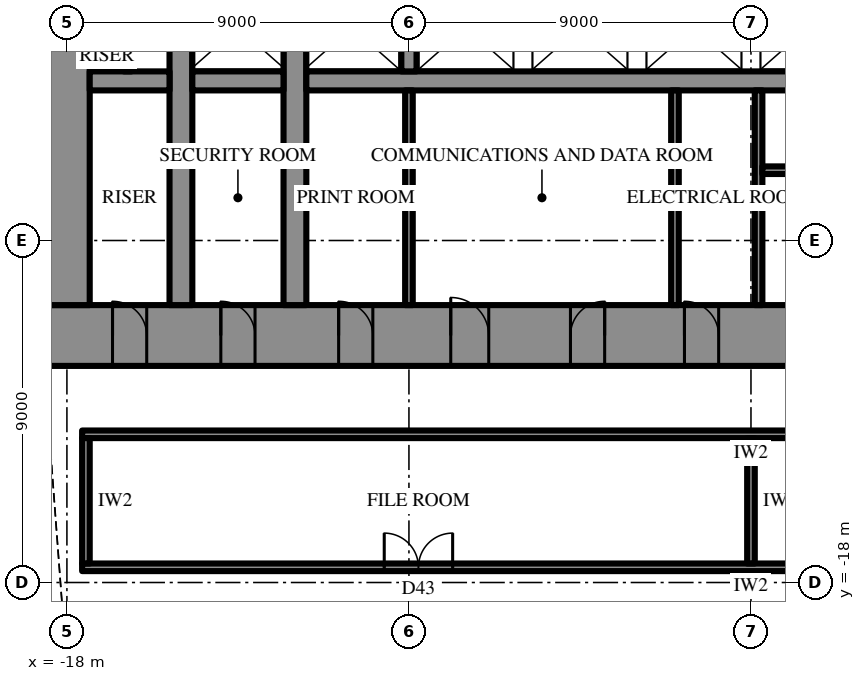
"""IFC4 building model, lengths in metres.
Left out: names, types, materials, properties, quantities, classifications, styles, units other than length and angle.
Written with IfcOpenShell. Run it as: python <this file> out.ifc"""

import sys

from ifc_helpers import new_model, si_unit, direction, frame, frame_2d, origin, place, context, subcontext, project, spatial, rectangle, extrude, element, fill, save


model = new_model("IFC4")
c1 = context("Model", 3, precision=1e-05, world=origin(), true_north=direction((0.0, 1.0)))
c2 = subcontext(c1, "Body", "Model", "MODEL_VIEW")
j1 = project(units=[si_unit("LENGTHUNIT", "METRE"), si_unit("PLANEANGLEUNIT", "RADIAN")], contexts=[c1])
p1 = place(None, origin())
s1 = spatial("IfcSite", under=j1, at=p1, CompositionType="ELEMENT")
p2 = place(p1, origin())
s2 = spatial("IfcBuilding", under=s1, at=p2, CompositionType="ELEMENT")
p3 = place(p2, frame((0.0, 0.0, 127.9)))
s3 = spatial("IfcBuildingStorey", under=s2, at=p3, CompositionType="ELEMENT", Elevation=127.9)
p4 = place(p3, frame((18.6, -11.5, 0.0), z_axis=(0.0, 0.0, 1.0), x_axis=(-1.0, 0.0, 0.0)))
e1 = element("IfcWall", 1, at=p4, inside=s3, PredefinedType="SHEAR", context=c2, shape_type="SweptSolid", body=[
    extrude(rectangle(XDim=37.2, YDim=1.6, at=frame_2d((18.6, 0.0))), origin(), (0.0, 0.0, 1.0), 4.2),
])
p5 = place(p4, frame((19.45, 0.0, 0.0)))
e2 = element("IfcOpeningElement", 2, at=p5, cuts=e1, PredefinedType="OPENING", context=c2, shape_type="SweptSolid", body=[
    extrude(rectangle(XDim=0.9, YDim=2.2, at=frame_2d((0.45, 1.1))), frame((0.0, 0.81, 0.0), z_axis=(0.0, -1.0, 0.0), x_axis=(1.0, 0.0, 0.0)), (0.0, 0.0, 1.0), 1.62),
])
p6 = place(p4, frame((22.45, 0.0, 0.0)))
e3 = element("IfcOpeningElement", 3, at=p6, cuts=e1, PredefinedType="OPENING", context=c2, shape_type="SweptSolid", body=[
    extrude(rectangle(XDim=0.9, YDim=2.2, at=frame_2d((0.45, 1.1))), frame((0.0, 0.81, 0.0), z_axis=(0.0, -1.0, 0.0), x_axis=(1.0, 0.0, 0.0)), (0.0, 0.0, 1.0), 1.62),
])
p7 = place(p4, frame((25.5, 0.0, 0.0)))
e4 = element("IfcOpeningElement", 4, at=p7, cuts=e1, PredefinedType="OPENING", context=c2, shape_type="SweptSolid", body=[
    extrude(rectangle(XDim=1.0, YDim=2.2, at=frame_2d((0.5, 1.1))), frame((0.0, 0.81, 0.0), z_axis=(0.0, -1.0, 0.0), x_axis=(1.0, 0.0, 0.0)), (0.0, 0.0, 1.0), 1.62),
])
p8 = place(p4, frame((1.8, 0.0, 0.0)))
e5 = element("IfcOpeningElement", 5, at=p8, cuts=e1, PredefinedType="OPENING", context=c2, shape_type="SweptSolid", body=[
    extrude(rectangle(XDim=0.9, YDim=2.2, at=frame_2d((0.45, 1.1))), frame((0.0, 0.81, 0.0), z_axis=(0.0, -1.0, 0.0), x_axis=(1.0, 0.0, 0.0)), (0.0, 0.0, 1.0), 1.62),
])
p9 = place(p4, frame((4.65, 0.0, 0.0)))
e6 = element("IfcOpeningElement", 6, at=p9, cuts=e1, PredefinedType="OPENING", context=c2, shape_type="SweptSolid", body=[
    extrude(rectangle(XDim=0.9, YDim=2.2, at=frame_2d((0.45, 1.1))), frame((0.0, 0.81, 0.0), z_axis=(0.0, -1.0, 0.0), x_axis=(1.0, 0.0, 0.0)), (0.0, 0.0, 1.0), 1.62),
])
p10 = place(p4, frame((7.75, 0.0, 0.0)))
e7 = element("IfcOpeningElement", 7, at=p10, cuts=e1, PredefinedType="OPENING", context=c2, shape_type="SweptSolid", body=[
    extrude(rectangle(XDim=0.9, YDim=2.2, at=frame_2d((0.45, 1.1))), frame((0.0, 0.81, 0.0), z_axis=(0.0, -1.0, 0.0), x_axis=(1.0, 0.0, 0.0)), (0.0, 0.0, 1.0), 1.62),
])
p11 = place(p4, frame((28.55, 0.0, 0.0)))
e8 = element("IfcOpeningElement", 8, at=p11, cuts=e1, PredefinedType="OPENING", context=c2, shape_type="SweptSolid", body=[
    extrude(rectangle(XDim=0.9, YDim=2.2, at=frame_2d((0.45, 1.1))), frame((0.0, 0.81, 0.0), z_axis=(0.0, -1.0, 0.0), x_axis=(1.0, 0.0, 0.0)), (0.0, 0.0, 1.0), 1.62),
])
p12 = place(p4, frame((31.65, 0.0, 0.0)))
e9 = element("IfcOpeningElement", 9, at=p12, cuts=e1, PredefinedType="OPENING", context=c2, shape_type="SweptSolid", body=[
    extrude(rectangle(XDim=0.9, YDim=2.2, at=frame_2d((0.45, 1.1))), frame((0.0, 0.81, 0.0), z_axis=(0.0, -1.0, 0.0), x_axis=(1.0, 0.0, 0.0)), (0.0, 0.0, 1.0), 1.62),
])
p13 = place(p4, frame((34.5, 0.0, 0.0)))
e10 = element("IfcOpeningElement", 10, at=p13, cuts=e1, PredefinedType="OPENING", context=c2, shape_type="SweptSolid", body=[
    extrude(rectangle(XDim=0.9, YDim=2.2, at=frame_2d((0.45, 1.1))), frame((0.0, 0.81, 0.0), z_axis=(0.0, -1.0, 0.0), x_axis=(1.0, 0.0, 0.0)), (0.0, 0.0, 1.0), 1.62),
])
p14 = place(p3, frame((-18.0, 10.7, 0.0), z_axis=(0.0, 0.0, 1.0), x_axis=(0.0, -1.0, 0.0)))
e11 = element("IfcWall", 11, at=p14, inside=s3, PredefinedType="SHEAR", context=c2, shape_type="SweptSolid", body=[
    extrude(rectangle(XDim=21.4, YDim=1.2, at=frame_2d((10.7, 0.0))), origin(), (0.0, 0.0, 1.0), 4.2),
])
p15 = place(p14, frame((9.8, 0.0, 0.0)))
e12 = element("IfcOpeningElement", 12, at=p15, cuts=e11, PredefinedType="OPENING", context=c2, shape_type="SweptSolid", body=[
    extrude(rectangle(XDim=1.8, YDim=2.4, at=frame_2d((0.9, 1.2))), frame((0.0, 0.61, 0.0), z_axis=(0.0, -1.0, 0.0), x_axis=(1.0, 0.0, 0.0)), (0.0, 0.0, 1.0), 1.22),
])
p16 = place(p3, frame((-12.0, -10.7, 0.0), z_axis=(0.0, 0.0, 1.0), x_axis=(0.0, 1.0, 0.0)))
e13 = element("IfcWall", 13, at=p16, inside=s3, PredefinedType="SHEAR", context=c2, shape_type="SweptSolid", body=[
    extrude(rectangle(XDim=21.4, YDim=0.6, at=frame_2d((10.7, 0.0))), origin(), (0.0, 0.0, 1.0), 4.2),
])
p17 = place(p16, frame((9.8, 0.0, 0.0)))
e14 = element("IfcOpeningElement", 14, at=p17, cuts=e13, PredefinedType="OPENING", context=c2, shape_type="SweptSolid", body=[
    extrude(rectangle(XDim=1.8, YDim=2.4, at=frame_2d((0.9, 1.2))), frame((0.0, 0.31, 0.0), z_axis=(0.0, -1.0, 0.0), x_axis=(1.0, 0.0, 0.0)), (0.0, 0.0, 1.0), 0.62),
])
p18 = place(p3, frame((-15.0, -10.7, 0.0), z_axis=(0.0, 0.0, 1.0), x_axis=(0.0, 1.0, 0.0)))
e15 = element("IfcWall", 15, at=p18, inside=s3, PredefinedType="SHEAR", context=c2, shape_type="SweptSolid", body=[
    extrude(rectangle(XDim=21.4, YDim=0.6, at=frame_2d((10.7, 0.0))), origin(), (0.0, 0.0, 1.0), 4.2),
])
p19 = place(p18, frame((9.8, 0.0, 0.0)))
e16 = element("IfcOpeningElement", 16, at=p19, cuts=e15, PredefinedType="OPENING", context=c2, shape_type="SweptSolid", body=[
    extrude(rectangle(XDim=1.8, YDim=2.4, at=frame_2d((0.9, 1.2))), frame((0.0, 0.31, 0.0), z_axis=(0.0, -1.0, 0.0), x_axis=(1.0, 0.0, 0.0)), (0.0, 0.0, 1.0), 0.62),
])
p20 = place(p3, frame((11.7, -4.8, 0.0), z_axis=(0.0, 0.0, 1.0), x_axis=(-1.0, 0.0, 0.0)))
e17 = element("IfcWall", 17, at=p20, inside=s3, PredefinedType="SHEAR", context=c2, shape_type="SweptSolid", body=[
    extrude(rectangle(XDim=23.4, YDim=0.5, at=frame_2d((11.7, 0.0))), origin(), (0.0, 0.0, 1.0), 4.2),
])
p21 = place(p20, frame((6.6, 0.0, 0.0)))
e18 = element("IfcOpeningElement", 18, at=p21, cuts=e17, PredefinedType="OPENING", context=c2, shape_type="SweptSolid", body=[
    extrude(rectangle(XDim=1.2, YDim=2.2, at=frame_2d((0.6, 1.1))), frame((0.0, 0.26, 0.0), z_axis=(0.0, -1.0, 0.0), x_axis=(1.0, 0.0, 0.0)), (0.0, 0.0, 1.0), 0.52),
])
p22 = place(p20, frame((3.6, 0.0, 0.0)))
e19 = element("IfcOpeningElement", 19, at=p22, cuts=e17, PredefinedType="OPENING", context=c2, shape_type="SweptSolid", body=[
    extrude(rectangle(XDim=1.2, YDim=2.2, at=frame_2d((0.6, 1.1))), frame((0.0, 0.26, 0.0), z_axis=(0.0, -1.0, 0.0), x_axis=(1.0, 0.0, 0.0)), (0.0, 0.0, 1.0), 0.52),
])
p23 = place(p3, frame((-12.3, -4.8, 0.0), z_axis=(0.0, 0.0, 1.0), x_axis=(-1.0, 0.0, 0.0)))
e20 = element("IfcWall", 20, at=p23, inside=s3, PredefinedType="SHEAR", context=c2, shape_type="SweptSolid", body=[
    extrude(rectangle(XDim=2.4, YDim=0.5, at=frame_2d((1.2, 0.0))), origin(), (0.0, 0.0, 1.0), 4.2),
])
p24 = place(p3, frame((-15.3, -4.8, 0.0), z_axis=(0.0, 0.0, 1.0), x_axis=(-1.0, 0.0, 0.0)))
e21 = element("IfcWall", 21, at=p24, inside=s3, PredefinedType="SHEAR", context=c2, shape_type="SweptSolid", body=[
    extrude(rectangle(XDim=2.1, YDim=0.5, at=frame_2d((1.05, 0.0))), origin(), (0.0, 0.0, 1.0), 4.2),
])
p25 = place(p3, frame((-9.0, -2.25, 0.0), z_axis=(0.0, 0.0, 1.0), x_axis=(0.0, -1.0, 0.0)))
e22 = element("IfcWall", 22, at=p25, inside=s3, PredefinedType="SHEAR", context=c2, shape_type="SweptSolid", body=[
    extrude(rectangle(XDim=2.3, YDim=0.4, at=frame_2d((1.15, 0.0))), origin(), (0.0, 0.0, 1.0), 4.2),
])
p26 = place(p3, frame((0.2, -5.05, 0.0), z_axis=(0.0, 0.0, 1.0), x_axis=(0.0, -1.0, 0.0)))
e23 = element("IfcWall", 23, at=p26, inside=s3, PredefinedType="SHEAR", context=c2, shape_type="SweptSolid", body=[
    extrude(rectangle(XDim=5.65, YDim=0.2, at=frame_2d((2.825, 0.0))), origin(), (0.0, 0.0, 1.0), 4.2),
])
p27 = place(p3, frame((8.9, -7.15, 0.0), z_axis=(0.0, 0.0, 1.0), x_axis=(-1.0, 0.0, 0.0)))
e24 = element("IfcWall", 24, at=p27, inside=s3, PredefinedType="SHEAR", context=c2, shape_type="SweptSolid", body=[
    extrude(rectangle(XDim=8.6, YDim=0.2, at=frame_2d((4.3, 0.0))), origin(), (0.0, 0.0, 1.0), 4.2),
])
p28 = place(p27, frame((0.3, 0.0, 0.0)))
e25 = element("IfcOpeningElement", 25, at=p28, cuts=e24, PredefinedType="OPENING", context=c2, shape_type="SweptSolid", body=[
    extrude(rectangle(XDim=1.0, YDim=2.2, at=frame_2d((0.5, 1.1))), frame((0.0, 0.11, 0.0), z_axis=(0.0, -1.0, 0.0), x_axis=(1.0, 0.0, 0.0)), (0.0, 0.0, 1.0), 0.22),
])
for number, where, z_axis, x_axis in (
    (26, (-9.0, -5.05, 0.0), (0.0, 0.0, 1.0), (0.0, -1.0, 0.0)),
    (27, (-2.0, -5.05, 0.0), (0.0, 0.0, 1.0), (0.0, -1.0, 0.0)),
):
    element("IfcWall", number, at=place(p3, frame(where, z_axis=z_axis, x_axis=x_axis)), inside=s3, PredefinedType="PARTITIONING", context=c2, shape_type="SweptSolid", body=[
        extrude(rectangle(XDim=5.65, YDim=0.2, at=frame_2d((2.825, 0.0))), origin(), (0.0, 0.0, 1.0), 4.0),
    ])
p29 = place(p3, frame((-16.4, -3.55, 0.0), z_axis=(0.0, 0.0, 1.0), x_axis=(0.0, -1.0, 0.0)))
e28 = element("IfcWall", 28, at=p29, inside=s3, PredefinedType="PARTITIONING", context=c2, shape_type="SweptSolid", body=[
    extrude(rectangle(XDim=1.0, YDim=0.2, at=frame_2d((0.5, 0.0))), origin(), (0.0, 0.0, 1.0), 4.0),
])
p30 = place(p3, frame((17.6, -14.1, 0.0), z_axis=(0.0, 0.0, 1.0), x_axis=(-1.0, 0.0, 0.0)))
e29 = element("IfcWall", 29, at=p30, inside=s3, PredefinedType="PARTITIONING", context=c2, shape_type="SweptSolid", body=[
    extrude(rectangle(XDim=35.2, YDim=0.2, at=frame_2d((17.6, 0.0))), origin(), (0.0, 0.0, 1.0), 4.0),
])
p31 = place(p3, frame((17.6, -17.6, 0.0), z_axis=(0.0, 0.0, 1.0), x_axis=(-1.0, 0.0, 0.0)))
e30 = element("IfcWall", 30, at=p31, inside=s3, PredefinedType="PARTITIONING", context=c2, shape_type="SweptSolid", body=[
    extrude(rectangle(XDim=35.2, YDim=0.2, at=frame_2d((17.6, 0.0))), origin(), (0.0, 0.0, 1.0), 4.0),
])
p32 = place(p31, frame((7.95, 0.0, 0.0)))
e31 = element("IfcOpeningElement", 31, at=p32, cuts=e30, PredefinedType="OPENING", context=c2, shape_type="SweptSolid", body=[
    extrude(rectangle(XDim=1.8, YDim=2.4, at=frame_2d((0.9, 1.2))), frame((0.0, 0.11, 0.0), z_axis=(0.0, -1.0, 0.0), x_axis=(1.0, 0.0, 0.0)), (0.0, 0.0, 1.0), 0.22),
])
p33 = place(p31, frame((25.45, 0.0, 0.0)))
e32 = element("IfcOpeningElement", 32, at=p33, cuts=e30, PredefinedType="OPENING", context=c2, shape_type="SweptSolid", body=[
    extrude(rectangle(XDim=1.8, YDim=2.4, at=frame_2d((0.9, 1.2))), frame((0.0, 0.11, 0.0), z_axis=(0.0, -1.0, 0.0), x_axis=(1.0, 0.0, 0.0)), (0.0, 0.0, 1.0), 0.22),
])
p34 = place(p3, frame((0.0, -14.2, 0.0), z_axis=(0.0, 0.0, 1.0), x_axis=(0.0, -1.0, 0.0)))
e33 = element("IfcWall", 33, at=p34, inside=s3, PredefinedType="PARTITIONING", context=c2, shape_type="SweptSolid", body=[
    extrude(rectangle(XDim=3.3, YDim=0.2, at=frame_2d((1.65, 0.0))), origin(), (0.0, 0.0, 1.0), 2.992),
])
p35 = place(p3, frame((-17.5, -14.2, 0.0), z_axis=(0.0, 0.0, 1.0), x_axis=(0.0, -1.0, 0.0)))
e34 = element("IfcWall", 34, at=p35, inside=s3, PredefinedType="PARTITIONING", context=c2, shape_type="SweptSolid", body=[
    extrude(rectangle(XDim=3.3, YDim=0.2, at=frame_2d((1.65, 0.0))), origin(), (0.0, 0.0, 1.0), 4.0),
])
p36 = place(p5, frame((0.9, 0.0, 0.0), z_axis=(0.0, 0.0, 1.0), x_axis=(-1.0, 0.0, 0.0)))
e35 = element("IfcDoor", 35, at=p36, inside=s3, OperationType="SINGLE_SWING_RIGHT", PredefinedType="DOOR", context=c2, shape_type="SweptSolid", body=[
    extrude(rectangle(XDim=0.9, YDim=2.2, at=frame_2d((0.45, 1.1))), frame((0.0, 0.025, 0.0), z_axis=(0.0, -1.0, 0.0), x_axis=(1.0, 0.0, 0.0)), (0.0, 0.0, 1.0), 0.05),
])
fill(e2, e35)
p37 = place(p6, frame((0.9, 0.0, 0.0), z_axis=(0.0, 0.0, 1.0), x_axis=(-1.0, 0.0, 0.0)))
e36 = element("IfcDoor", 36, at=p37, inside=s3, OperationType="SINGLE_SWING_LEFT", PredefinedType="DOOR", context=c2, shape_type="SweptSolid", body=[
    extrude(rectangle(XDim=0.9, YDim=2.2, at=frame_2d((0.45, 1.1))), frame((0.0, 0.025, 0.0), z_axis=(0.0, -1.0, 0.0), x_axis=(1.0, 0.0, 0.0)), (0.0, 0.0, 1.0), 0.05),
])
fill(e3, e36)
p38 = place(p7, frame((1.0, 0.0, 0.0), z_axis=(0.0, 0.0, 1.0), x_axis=(-1.0, 0.0, 0.0)))
e37 = element("IfcDoor", 37, at=p38, inside=s3, OperationType="SINGLE_SWING_RIGHT", PredefinedType="DOOR", context=c2, shape_type="SweptSolid", body=[
    extrude(rectangle(XDim=1.0, YDim=2.2, at=frame_2d((0.5, 1.1))), frame((0.0, 0.025, 0.0), z_axis=(0.0, -1.0, 0.0), x_axis=(1.0, 0.0, 0.0)), (0.0, 0.0, 1.0), 0.05),
])
fill(e4, e37)
p39 = place(p11, frame((0.9, 0.0, 0.0), z_axis=(0.0, 0.0, 1.0), x_axis=(-1.0, 0.0, 0.0)))
e38 = element("IfcDoor", 38, at=p39, inside=s3, OperationType="SINGLE_SWING_RIGHT", PredefinedType="DOOR", context=c2, shape_type="SweptSolid", body=[
    extrude(rectangle(XDim=0.9, YDim=2.2, at=frame_2d((0.45, 1.1))), frame((0.0, 0.025, 0.0), z_axis=(0.0, -1.0, 0.0), x_axis=(1.0, 0.0, 0.0)), (0.0, 0.0, 1.0), 0.05),
])
fill(e8, e38)
p40 = place(p12, frame((0.9, 0.0, 0.0), z_axis=(0.0, 0.0, 1.0), x_axis=(-1.0, 0.0, 0.0)))
e39 = element("IfcDoor", 39, at=p40, inside=s3, OperationType="SINGLE_SWING_RIGHT", PredefinedType="DOOR", context=c2, shape_type="SweptSolid", body=[
    extrude(rectangle(XDim=0.9, YDim=2.2, at=frame_2d((0.45, 1.1))), frame((0.0, 0.025, 0.0), z_axis=(0.0, -1.0, 0.0), x_axis=(1.0, 0.0, 0.0)), (0.0, 0.0, 1.0), 0.05),
])
fill(e9, e39)
p41 = place(p13, frame((0.9, 0.0, 0.0), z_axis=(0.0, 0.0, 1.0), x_axis=(-1.0, 0.0, 0.0)))
e40 = element("IfcDoor", 40, at=p41, inside=s3, OperationType="SINGLE_SWING_RIGHT", PredefinedType="DOOR", context=c2, shape_type="SweptSolid", body=[
    extrude(rectangle(XDim=0.9, YDim=2.2, at=frame_2d((0.45, 1.1))), frame((0.0, 0.025, 0.0), z_axis=(0.0, -1.0, 0.0), x_axis=(1.0, 0.0, 0.0)), (0.0, 0.0, 1.0), 0.05),
])
fill(e10, e40)
p42 = place(p33, frame((1.8, 0.0, 0.0), z_axis=(0.0, 0.0, 1.0), x_axis=(-1.0, 0.0, 0.0)))
e41 = element("IfcDoor", 41, at=p42, inside=s3, OperationType="DOUBLE_DOOR_SINGLE_SWING", PredefinedType="DOOR", context=c2, shape_type="SweptSolid", body=[
    extrude(rectangle(XDim=1.8, YDim=2.4, at=frame_2d((0.9, 1.2))), frame((0.0, 0.025, 0.0), z_axis=(0.0, -1.0, 0.0), x_axis=(1.0, 0.0, 0.0)), (0.0, 0.0, 1.0), 0.05),
])
fill(e32, e41)
save(model, sys.argv[1])
